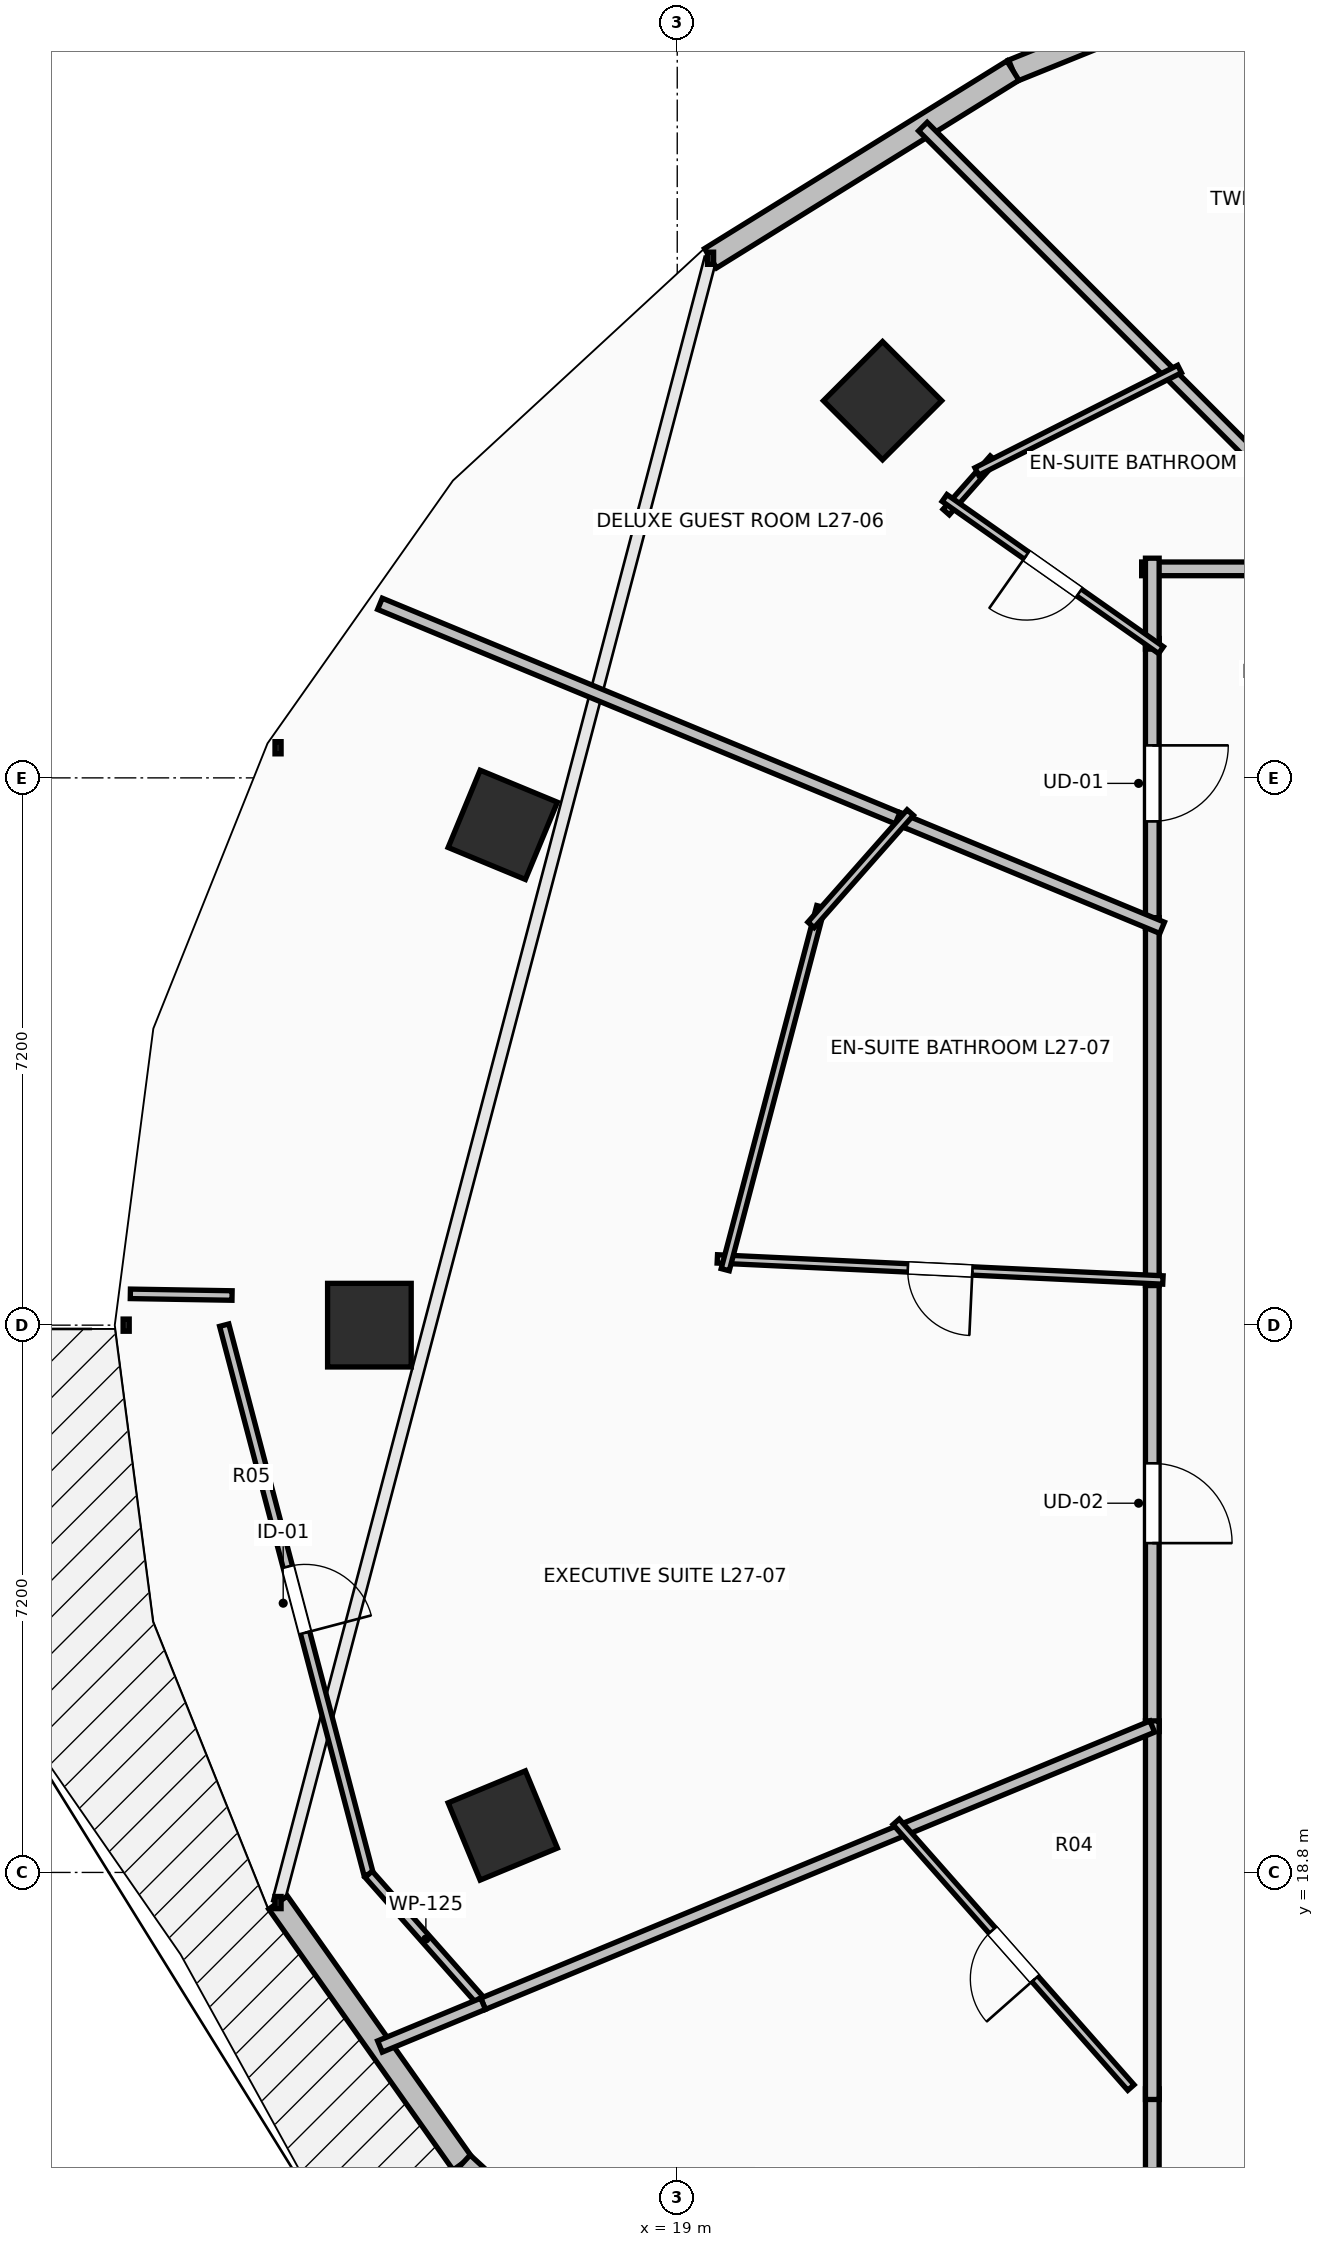
"""IFC4 building model, lengths in metres.
Left out: names, types, materials, properties, quantities, classifications, styles, units other than length and angle.
Written with IfcOpenShell. Run it as: python <this file> out.ifc"""

import sys

from ifc_helpers import new_model, si_unit, direction, frame, frame_2d, origin, origin_2d, place, context, subcontext, project, spatial, rectangle, extrude, element, fill, save


model = new_model("IFC4")
c1 = context("Model", 3, precision=1e-05, world=origin(), true_north=direction((0.0, 1.0)))
c2 = subcontext(c1, "Body", "Model", "MODEL_VIEW")
j1 = project(units=[si_unit("LENGTHUNIT", "METRE"), si_unit("PLANEANGLEUNIT", "RADIAN")], contexts=[c1])
p1 = place(None, origin())
s1 = spatial("IfcSite", under=j1, at=p1, CompositionType="ELEMENT")
p2 = place(p1, origin())
s2 = spatial("IfcBuilding", under=s1, at=p2, CompositionType="ELEMENT")
p3 = place(p2, frame((0.0, 0.0, 103.3)))
s3 = spatial("IfcBuildingStorey", under=s2, at=p3, CompositionType="ELEMENT", Elevation=103.3)
for number, where, z_axis, x_axis in (
    (1, (21.701, 38.162, 0.0), (0.0, 0.0, 1.0), (-0.707, 0.707, 0.0)),
    (2, (16.705, 32.582, 0.0), (0.0, 0.0, 1.0), (-0.924, 0.383, 0.0)),
    (3, (14.95, 26.0, 0.0), (0.0, 0.0, 1.0), (-1.0, 0.0, 0.0)),
    (4, (16.705, 19.418, 0.0), (0.0, 0.0, 1.0), (-0.924, -0.383, 0.0)),
):
    element("IfcColumn", number, at=place(p3, frame(where, z_axis=z_axis, x_axis=x_axis)), inside=s3, PredefinedType="COLUMN", context=c2, shape_type="SweptSolid", body=[
        extrude(rectangle(XDim=1.1, YDim=1.1, at=origin_2d()), origin(), (0.0, 0.0, 1.0), 3.5),
    ])
p4 = place(p3, frame((27.955, 44.339, 0.0), z_axis=(0.0, 0.0, 1.0), x_axis=(-0.927122233109, -0.374759075775, 0.0)))
e5 = element("IfcWall", 5, at=p4, inside=s3, PredefinedType="STANDARD", context=c2, shape_type="SweptSolid", body=[
    extrude(rectangle(XDim=4.895, YDim=0.3, at=frame_2d((2.448, 0.0))), origin(), (0.0, 0.0, 1.0), 3.24),
])
p5 = place(p4, frame((1.877, 0.0, 0.85)))
e6 = element("IfcOpeningElement", 6, at=p5, cuts=e5, PredefinedType="OPENING", context=c2, shape_type="SweptSolid", body=[
    extrude(rectangle(XDim=1.2, YDim=1.95, at=frame_2d((0.6, 0.975))), frame((0.0, 0.165, 0.0), z_axis=(0.0, -1.0, 0.0), x_axis=(1.0, 0.0, 0.0)), (0.0, 0.0, 1.0), 0.33),
])
p6 = place(p3, frame((23.416, 42.505, 0.0), z_axis=(0.0, 0.0, 1.0), x_axis=(-0.849684479743, -0.527291461038, 0.0)))
e7 = element("IfcWall", 7, at=p6, inside=s3, PredefinedType="STANDARD", context=c2, shape_type="SweptSolid", body=[
    extrude(rectangle(XDim=4.681, YDim=0.3, at=frame_2d((2.341, 0.0))), origin(), (0.0, 0.0, 1.0), 3.24),
])
p7 = place(p3, frame((13.748, 18.404, 0.0), z_axis=(0.0, 0.0, 1.0), x_axis=(0.57716435238, -0.81662801222, 0.0)))
e8 = element("IfcWall", 8, at=p7, inside=s3, PredefinedType="STANDARD", context=c2, shape_type="SweptSolid", body=[
    extrude(rectangle(XDim=4.202, YDim=0.3, at=frame_2d((2.101, 0.0))), origin(), (0.0, 0.0, 1.0), 3.24),
])
p8 = place(p3, frame((16.174, 14.972, 0.0), z_axis=(0.0, 0.0, 1.0), x_axis=(0.735416718093, -0.677615119924, 0.0)))
e9 = element("IfcWall", 9, at=p8, inside=s3, PredefinedType="STANDARD", context=c2, shape_type="SweptSolid", body=[
    extrude(rectangle(XDim=4.439, YDim=0.3, at=frame_2d((2.22, 0.0))), origin(), (0.0, 0.0, 1.0), 3.24),
])
p9 = place(p8, frame((1.419, 0.0, 0.0)))
e10 = element("IfcOpeningElement", 10, at=p9, cuts=e9, PredefinedType="OPENING", context=c2, shape_type="SweptSolid", body=[
    extrude(rectangle(XDim=1.6, YDim=2.3, at=frame_2d((0.8, 1.15))), frame((0.0, 0.165, 0.0), z_axis=(0.0, -1.0, 0.0), x_axis=(1.0, 0.0, 0.0)), (0.0, 0.0, 1.0), 0.33),
])
p10 = place(p3, frame((25.25, 35.034, 0.0), z_axis=(0.0, 0.0, 1.0), x_axis=(0.0, -1.0, 0.0)))
e11 = element("IfcWall", 11, at=p10, inside=s3, PredefinedType="PARTITIONING", context=c2, shape_type="SweptSolid", body=[
    extrude(rectangle(XDim=3.813, YDim=0.18, at=frame_2d((1.906, 0.0))), origin(), (0.0, 0.0, 1.0), 2.432),
])
p11 = place(p10, frame((1.406, 0.0, 0.0)))
e12 = element("IfcOpeningElement", 12, at=p11, cuts=e11, PredefinedType="OPENING", context=c2, shape_type="SweptSolid", body=[
    extrude(rectangle(XDim=1.0, YDim=2.15, at=frame_2d((0.5, 1.075))), frame((0.0, 0.105, 0.0), z_axis=(0.0, -1.0, 0.0), x_axis=(1.0, 0.0, 0.0)), (0.0, 0.0, 1.0), 0.21),
])
p12 = place(p3, frame((28.105, 35.95, 0.0), z_axis=(0.0, 0.0, 1.0), x_axis=(-1.0, 0.0, 0.0)))
e13 = element("IfcWall", 13, at=p12, inside=s3, PredefinedType="PARTITIONING", context=c2, shape_type="SweptSolid", body=[
    extrude(rectangle(XDim=2.995, YDim=0.18, at=frame_2d((1.498, 0.0))), origin(), (0.0, 0.0, 1.0), 2.432),
])
p13 = place(p3, frame((25.25, 36.09, 0.0), z_axis=(0.0, 0.0, 1.0), x_axis=(0.0, -1.0, 0.0)))
e14 = element("IfcWall", 14, at=p13, inside=s3, PredefinedType="PARTITIONING", context=c2, shape_type="SweptSolid", body=[
    extrude(rectangle(XDim=1.196, YDim=0.18, at=frame_2d((0.598, 0.0))), origin(), (0.0, 0.0, 1.0), 2.432),
])
p14 = place(p3, frame((25.25, 26.661, 0.0), z_axis=(0.0, 0.0, 1.0), x_axis=(0.0, -1.0, 0.0)))
e15 = element("IfcWall", 15, at=p14, inside=s3, PredefinedType="PARTITIONING", context=c2, shape_type="SweptSolid", body=[
    extrude(rectangle(XDim=6.007, YDim=0.18, at=frame_2d((3.003, 0.0))), origin(), (0.0, 0.0, 1.0), 3.24),
])
p15 = place(p14, frame((2.479, 0.0, 0.0)))
e16 = element("IfcOpeningElement", 16, at=p15, cuts=e15, PredefinedType="OPENING", context=c2, shape_type="SweptSolid", body=[
    extrude(rectangle(XDim=1.05, YDim=2.2, at=frame_2d((0.525, 1.1))), frame((0.0, 0.105, 0.0), z_axis=(0.0, -1.0, 0.0), x_axis=(1.0, 0.0, 0.0)), (0.0, 0.0, 1.0), 0.21),
])
p16 = place(p3, frame((25.25, 31.361, 0.0), z_axis=(0.0, 0.0, 1.0), x_axis=(0.0, -1.0, 0.0)))
e17 = element("IfcWall", 17, at=p16, inside=s3, PredefinedType="PARTITIONING", context=c2, shape_type="SweptSolid", body=[
    extrude(rectangle(XDim=4.84, YDim=0.18, at=frame_2d((2.42, 0.0))), origin(), (0.0, 0.0, 1.0), 2.432),
])
p17 = place(p3, frame((25.25, 15.953, 0.0), z_axis=(0.0, 0.0, 1.0), x_axis=(0.0, -1.0, 0.0)))
e18 = element("IfcWall", 18, at=p17, inside=s3, PredefinedType="PARTITIONING", context=c2, shape_type="SweptSolid", body=[
    extrude(rectangle(XDim=1.853, YDim=0.18, at=frame_2d((0.926, 0.0))), origin(), (0.0, 0.0, 1.0), 2.432),
])
p18 = place(p3, frame((25.25, 20.794, 0.0), z_axis=(0.0, 0.0, 1.0), x_axis=(0.0, -1.0, 0.0)))
e19 = element("IfcWall", 19, at=p18, inside=s3, PredefinedType="PARTITIONING", context=c2, shape_type="SweptSolid", body=[
    extrude(rectangle(XDim=4.981, YDim=0.18, at=frame_2d((2.49, 0.0))), origin(), (0.0, 0.0, 1.0), 2.432),
])
p19 = place(p3, frame((22.232, 41.768, 0.0), z_axis=(0.0, 0.0, 1.0), x_axis=(0.707106781187, -0.707106781187, 0.0)))
e20 = element("IfcWall", 20, at=p19, inside=s3, PredefinedType="PARTITIONING", context=c2, shape_type="SweptSolid", body=[
    extrude(rectangle(XDim=8.228, YDim=0.16, at=frame_2d((4.114, 0.0))), origin(), (0.0, 0.0, 1.0), 2.432),
])
p20 = place(p3, frame((22.538, 36.697, 0.0), z_axis=(0.0, 0.0, 1.0), x_axis=(0.662242037053, 0.749289986827, 0.0)))
e21 = element("IfcWall", 21, at=p20, inside=s3, PredefinedType="PARTITIONING", context=c2, shape_type="SweptSolid", body=[
    extrude(rectangle(XDim=0.937, YDim=0.11, at=frame_2d((0.468, 0.0))), origin(), (0.0, 0.0, 1.0), 2.432),
])
p21 = place(p3, frame((22.941, 37.231, 0.0), z_axis=(0.0, 0.0, 1.0), x_axis=(0.892507731149, 0.451032094024, 0.0)))
e22 = element("IfcWall", 22, at=p21, inside=s3, PredefinedType="PARTITIONING", context=c2, shape_type="SweptSolid", body=[
    extrude(rectangle(XDim=2.989, YDim=0.11, at=frame_2d((1.495, 0.0))), origin(), (0.0, 0.0, 1.0), 2.432),
])
p22 = place(p3, frame((25.365, 34.881, 0.0), z_axis=(0.0, 0.0, 1.0), x_axis=(-0.81809360258, 0.575085087111, 0.0)))
e23 = element("IfcWall", 23, at=p22, inside=s3, PredefinedType="PARTITIONING", context=c2, shape_type="SweptSolid", body=[
    extrude(rectangle(XDim=3.481, YDim=0.11, at=frame_2d((1.741, 0.0))), origin(), (0.0, 0.0, 1.0), 2.432),
])
p23 = place(p22, frame((1.316, 0.0, 0.0)))
e24 = element("IfcOpeningElement", 24, at=p23, cuts=e23, PredefinedType="OPENING", context=c2, shape_type="SweptSolid", body=[
    extrude(rectangle(XDim=0.85, YDim=2.1, at=frame_2d((0.425, 1.05))), frame((0.0, 0.07, 0.0), z_axis=(0.0, -1.0, 0.0), x_axis=(1.0, 0.0, 0.0)), (0.0, 0.0, 1.0), 0.14),
])
p24 = place(p3, frame((15.089, 35.49, 0.0), z_axis=(0.0, 0.0, 1.0), x_axis=(0.923888472039, -0.382661849723, 0.0)))
e25 = element("IfcWall", 25, at=p24, inside=s3, PredefinedType="PARTITIONING", context=c2, shape_type="SweptSolid", body=[
    extrude(rectangle(XDim=7.51, YDim=0.16, at=frame_2d((3.755, 0.0))), origin(), (0.0, 0.0, 1.0), 2.677),
])
p25 = place(p3, frame((21.899, 32.669, 0.0), z_axis=(0.0, 0.0, 1.0), x_axis=(0.923843852071, -0.382769561211, 0.0)))
e26 = element("IfcWall", 26, at=p25, inside=s3, PredefinedType="PARTITIONING", context=c2, shape_type="SweptSolid", body=[
    extrude(rectangle(XDim=3.768, YDim=0.16, at=frame_2d((1.884, 0.0))), origin(), (0.0, 0.0, 1.0), 2.886),
])
p26 = place(p3, frame((25.39, 26.594, 0.0), z_axis=(0.0, 0.0, 1.0), x_axis=(-0.998884920498, 0.047211392719, 0.0)))
e27 = element("IfcWall", 27, at=p26, inside=s3, PredefinedType="PARTITIONING", context=c2, shape_type="SweptSolid", body=[
    extrude(rectangle(XDim=5.869, YDim=0.11, at=frame_2d((2.935, 0.0))), origin(), (0.0, 0.0, 1.0), 2.432),
])
p27 = place(p26, frame((2.51, 0.0, 0.0)))
e28 = element("IfcOpeningElement", 28, at=p27, cuts=e27, PredefinedType="OPENING", context=c2, shape_type="SweptSolid", body=[
    extrude(rectangle(XDim=0.85, YDim=2.1, at=frame_2d((0.425, 1.05))), frame((0.0, 0.07, 0.0), z_axis=(0.0, -1.0, 0.0), x_axis=(1.0, 0.0, 0.0)), (0.0, 0.0, 1.0), 0.14),
])
p28 = place(p3, frame((19.631, 26.729, 0.0), z_axis=(0.0, 0.0, 1.0), x_axis=(0.254541956306, 0.967061731473, 0.0)))
e29 = element("IfcWall", 29, at=p28, inside=s3, PredefinedType="PARTITIONING", context=c2, shape_type="SweptSolid", body=[
    extrude(rectangle(XDim=4.939, YDim=0.11, at=frame_2d((2.47, 0.0))), origin(), (0.0, 0.0, 1.0), 2.432),
])
p29 = place(p3, frame((20.76, 31.266, 0.0), z_axis=(0.0, 0.0, 1.0), x_axis=(0.662047420969, 0.749461948593, 0.0)))
e30 = element("IfcWall", 30, at=p29, inside=s3, PredefinedType="PARTITIONING", context=c2, shape_type="SweptSolid", body=[
    extrude(rectangle(XDim=1.972, YDim=0.11, at=frame_2d((0.986, 0.0))), origin(), (0.0, 0.0, 1.0), 3.24),
])
p30 = place(p3, frame((11.805, 26.412, 0.0), z_axis=(0.0, 0.0, 1.0), x_axis=(0.999862201843, -0.01660052187, 0.0)))
e31 = element("IfcWall", 31, at=p30, inside=s3, PredefinedType="PARTITIONING", context=c2, shape_type="SweptSolid", body=[
    extrude(rectangle(XDim=1.338, YDim=0.125, at=frame_2d((0.669, 0.0))), origin(), (0.0, 0.0, 1.0), 3.24),
])
p31 = place(p3, frame((13.04, 26.0, 0.0), z_axis=(0.0, 0.0, 1.0), x_axis=(0.254345287821, -0.967113475536, 0.0)))
e32 = element("IfcWall", 32, at=p31, inside=s3, PredefinedType="PARTITIONING", context=c2, shape_type="SweptSolid", body=[
    extrude(rectangle(XDim=7.47, YDim=0.125, at=frame_2d((3.735, 0.0))), origin(), (0.0, 0.0, 1.0), 3.24),
])
p32 = place(p31, frame((3.285, 0.0, 0.0)))
e33 = element("IfcOpeningElement", 33, at=p32, cuts=e32, PredefinedType="OPENING", context=c2, shape_type="SweptSolid", body=[
    extrude(rectangle(XDim=0.9, YDim=2.1, at=frame_2d((0.45, 1.05))), frame((0.0, 0.077, 0.0), z_axis=(0.0, -1.0, 0.0), x_axis=(1.0, 0.0, 0.0)), (0.0, 0.0, 1.0), 0.155),
])
p33 = place(p3, frame((14.94, 18.776, 0.0), z_axis=(0.0, 0.0, 1.0), x_axis=(0.662288913482, -0.749248553605, 0.0)))
e34 = element("IfcWall", 34, at=p33, inside=s3, PredefinedType="PARTITIONING", context=c2, shape_type="SweptSolid", body=[
    extrude(rectangle(XDim=2.274, YDim=0.125, at=frame_2d((1.137, 0.0))), origin(), (0.0, 0.0, 1.0), 3.24),
])
p34 = place(p3, frame((16.446, 17.072, 0.0), z_axis=(0.0, 0.0, 1.0), x_axis=(0.92387006918, 0.382706278068, 0.0)))
e35 = element("IfcWall", 35, at=p34, inside=s3, PredefinedType="PARTITIONING", context=c2, shape_type="SweptSolid", body=[
    extrude(rectangle(XDim=9.53, YDim=0.16, at=frame_2d((4.765, 0.0))), origin(), (0.0, 0.0, 1.0), 2.432),
])
p35 = place(p3, frame((15.089, 16.51, 0.0), z_axis=(0.0, 0.0, 1.0), x_axis=(0.923891226159, 0.382655200183, 0.0)))
e36 = element("IfcWall", 36, at=p35, inside=s3, PredefinedType="PARTITIONING", context=c2, shape_type="SweptSolid", body=[
    extrude(rectangle(XDim=1.469, YDim=0.16, at=frame_2d((0.734, 0.0))), origin(), (0.0, 0.0, 1.0), 3.24),
])
p36 = place(p3, frame((24.969, 15.97, 0.0), z_axis=(0.0, 0.0, 1.0), x_axis=(-0.662106207726, 0.749410014405, 0.0)))
e37 = element("IfcWall", 37, at=p36, inside=s3, PredefinedType="PARTITIONING", context=c2, shape_type="SweptSolid", body=[
    extrude(rectangle(XDim=4.665, YDim=0.11, at=frame_2d((2.332, 0.0))), origin(), (0.0, 0.0, 1.0), 2.432),
])
p37 = place(p36, frame((1.907, 0.0, 0.0)))
e38 = element("IfcOpeningElement", 38, at=p37, cuts=e37, PredefinedType="OPENING", context=c2, shape_type="SweptSolid", body=[
    extrude(rectangle(XDim=0.85, YDim=2.1, at=frame_2d((0.425, 1.05))), frame((0.0, 0.07, 0.0), z_axis=(0.0, -1.0, 0.0), x_axis=(1.0, 0.0, 0.0)), (0.0, 0.0, 1.0), 0.14),
])
p38 = place(p11, origin())
e39 = element("IfcDoor", 39, at=p38, inside=s3, OperationType="SINGLE_SWING_LEFT", PredefinedType="DOOR", context=c2, shape_type="SweptSolid", body=[
    extrude(rectangle(XDim=1.0, YDim=2.15, at=frame_2d((0.5, 1.075))), frame((0.0, 0.025, 0.0), z_axis=(0.0, -1.0, 0.0), x_axis=(1.0, 0.0, 0.0)), (0.0, 0.0, 1.0), 0.05),
])
fill(e12, e39)
p39 = place(p15, origin())
e40 = element("IfcDoor", 40, at=p39, inside=s3, OperationType="SINGLE_SWING_RIGHT", PredefinedType="DOOR", context=c2, shape_type="SweptSolid", body=[
    extrude(rectangle(XDim=1.05, YDim=2.2, at=frame_2d((0.525, 1.1))), frame((0.0, 0.025, 0.0), z_axis=(0.0, -1.0, 0.0), x_axis=(1.0, 0.0, 0.0)), (0.0, 0.0, 1.0), 0.05),
])
fill(e16, e40)
p40 = place(p23, origin())
e41 = element("IfcDoor", 41, at=p40, inside=s3, OperationType="SINGLE_SWING_RIGHT", PredefinedType="DOOR", context=c2, shape_type="SweptSolid", body=[
    extrude(rectangle(XDim=0.85, YDim=2.1, at=frame_2d((0.425, 1.05))), frame((0.0, 0.025, 0.0), z_axis=(0.0, -1.0, 0.0), x_axis=(1.0, 0.0, 0.0)), (0.0, 0.0, 1.0), 0.05),
])
fill(e24, e41)
p41 = place(p27, origin())
e42 = element("IfcDoor", 42, at=p41, inside=s3, OperationType="SINGLE_SWING_LEFT", PredefinedType="DOOR", context=c2, shape_type="SweptSolid", body=[
    extrude(rectangle(XDim=0.85, YDim=2.1, at=frame_2d((0.425, 1.05))), frame((0.0, 0.025, 0.0), z_axis=(0.0, -1.0, 0.0), x_axis=(1.0, 0.0, 0.0)), (0.0, 0.0, 1.0), 0.05),
])
fill(e28, e42)
p42 = place(p32, origin())
e43 = element("IfcDoor", 43, at=p42, inside=s3, OperationType="SINGLE_SWING_RIGHT", PredefinedType="DOOR", context=c2, shape_type="SweptSolid", body=[
    extrude(rectangle(XDim=0.9, YDim=2.1, at=frame_2d((0.45, 1.05))), frame((0.0, 0.025, 0.0), z_axis=(0.0, -1.0, 0.0), x_axis=(1.0, 0.0, 0.0)), (0.0, 0.0, 1.0), 0.05),
])
fill(e33, e43)
p43 = place(p37, origin())
e44 = element("IfcDoor", 44, at=p43, inside=s3, OperationType="SINGLE_SWING_LEFT", PredefinedType="DOOR", context=c2, shape_type="SweptSolid", body=[
    extrude(rectangle(XDim=0.85, YDim=2.1, at=frame_2d((0.425, 1.05))), frame((0.0, 0.025, 0.0), z_axis=(0.0, -1.0, 0.0), x_axis=(1.0, 0.0, 0.0)), (0.0, 0.0, 1.0), 0.05),
])
fill(e38, e44)
save(model, sys.argv[1])
